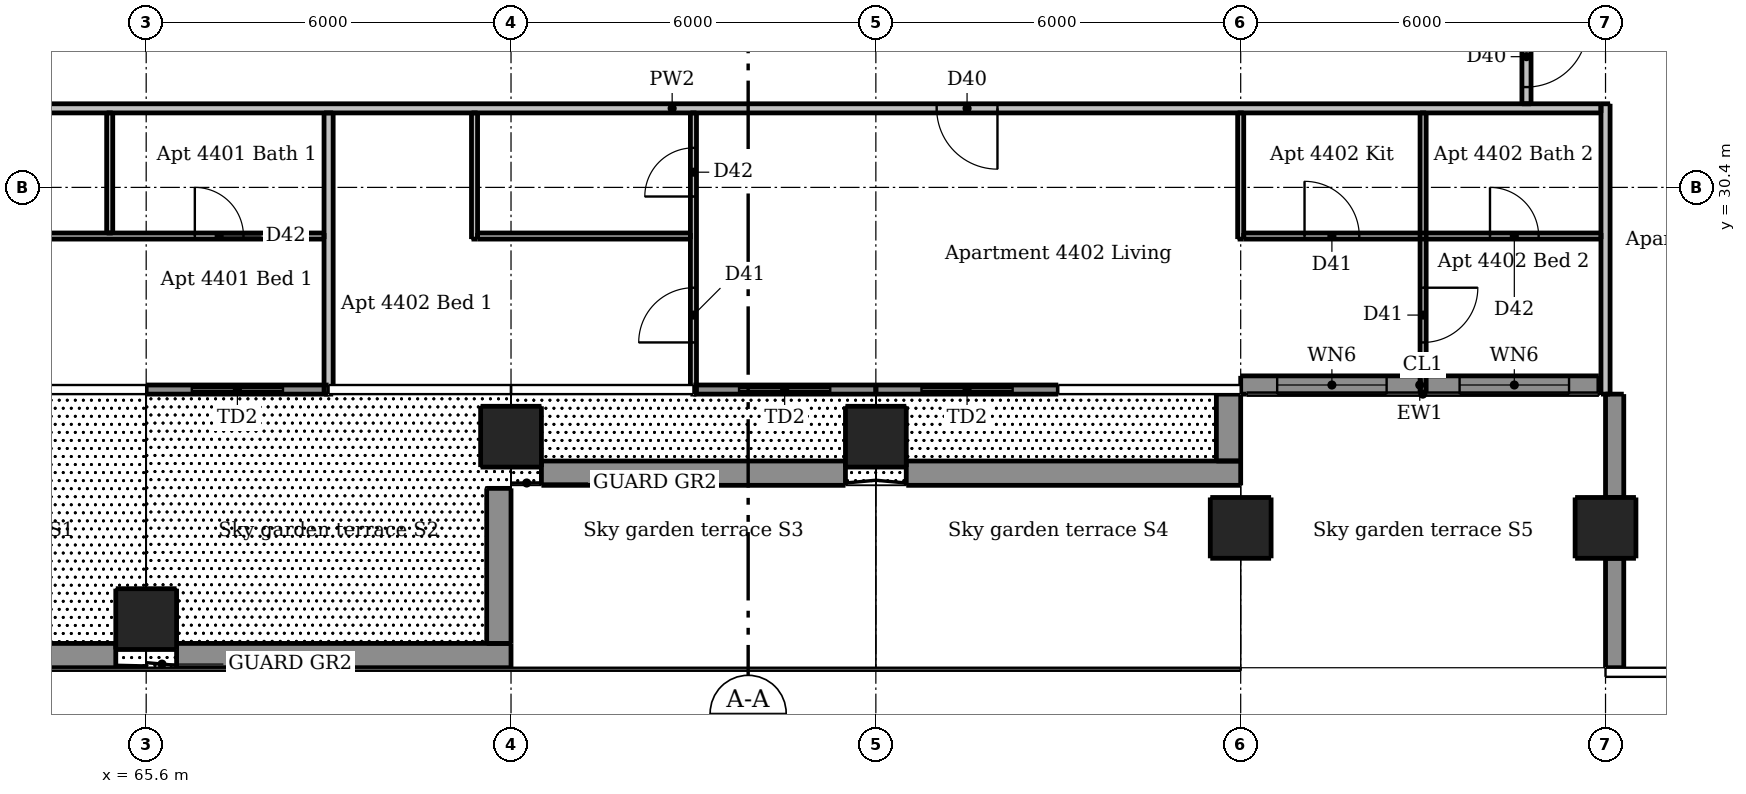
"""IFC4 building model, lengths in metres.
Left out: names, types, materials, properties, quantities, classifications, styles, units other than length and angle.
Written with IfcOpenShell. Run it as: python <this file> out.ifc"""

import sys

from ifc_helpers import new_model, si_unit, direction, frame, frame_2d, origin, origin_2d, place, context, subcontext, project, spatial, rectangle, extrude, element, fill, save


model = new_model("IFC4")
c1 = context("Model", 3, precision=1e-05, world=origin(), true_north=direction((0.0, 1.0)))
c2 = subcontext(c1, "Body", "Model", "MODEL_VIEW")
j1 = project(units=[si_unit("LENGTHUNIT", "METRE"), si_unit("PLANEANGLEUNIT", "RADIAN")], contexts=[c1])
p1 = place(None, origin())
s1 = spatial("IfcSite", under=j1, at=p1, CompositionType="ELEMENT")
p2 = place(p1, origin())
s2 = spatial("IfcBuilding", under=s1, at=p2, CompositionType="ELEMENT")
p3 = place(p2, frame((0.0, 0.0, 164.8)))
s3 = spatial("IfcBuildingStorey", under=s2, at=p3, CompositionType="ELEMENT", Elevation=164.8)
for number, where, z_axis, x_axis in (
    (1, (65.6, 23.3, 0.0), (0.0, 0.0, 1.0), (1.0, 0.0, 0.0)),
    (2, (71.6, 26.3, 0.0), (0.0, 0.0, 1.0), (1.0, 0.0, 0.0)),
    (3, (77.6, 26.3, 0.0), (0.0, 0.0, 1.0), (1.0, 0.0, 0.0)),
    (4, (83.6, 24.8, 0.0), (0.0, 0.0, 1.0), (1.0, 0.0, 0.0)),
):
    element("IfcColumn", number, at=place(p3, frame(where, z_axis=z_axis, x_axis=x_axis)), inside=s3, PredefinedType="COLUMN", context=c2, shape_type="SweptSolid", body=[
        extrude(rectangle(XDim=1.0, YDim=1.0, at=origin_2d()), origin(), (0.0, 0.0, 1.0), 3.3),
    ])
p4 = place(p3, frame((89.6, 24.8, 0.0), z_axis=(0.0, 0.0, 1.0), x_axis=(1.0, 0.0, 0.0)))
e5 = element("IfcColumn", 5, at=p4, inside=s3, PredefinedType="COLUMN", context=c2, shape_type="SweptSolid", body=[
    extrude(rectangle(XDim=1.0, YDim=1.0, at=origin_2d()), origin(), (0.0, 0.0, 1.0), 3.05),
])
p5 = place(p3, frame((89.75, 27.0, 0.0), z_axis=(0.0, 0.0, 1.0), x_axis=(0.0, -1.0, 0.0)))
e6 = element("IfcWall", 6, at=p5, inside=s3, PredefinedType="SOLIDWALL", context=c2, shape_type="SweptSolid", body=[
    extrude(rectangle(XDim=1.7, YDim=0.3, at=frame_2d((0.85, 0.0))), origin(), (0.0, 0.0, 1.0), 3.05),
])
p6 = place(p3, frame((89.75, 24.3, 0.0), z_axis=(0.0, 0.0, 1.0), x_axis=(0.0, -1.0, 0.0)))
e7 = element("IfcWall", 7, at=p6, inside=s3, PredefinedType="SOLIDWALL", context=c2, shape_type="SweptSolid", body=[
    extrude(rectangle(XDim=1.8, YDim=0.3, at=frame_2d((0.9, 0.0))), origin(), (0.0, 0.0, 1.0), 3.05),
])
p7 = place(p3, frame((65.6, 27.075, 0.0), z_axis=(0.0, 0.0, 1.0), x_axis=(1.0, 0.0, 0.0)))
e8 = element("IfcWall", 8, at=p7, inside=s3, PredefinedType="SOLIDWALL", context=c2, shape_type="SweptSolid", body=[
    extrude(rectangle(XDim=3.0, YDim=0.15, at=frame_2d((1.5, 0.0))), origin(), (0.0, 0.0, 1.0), 3.05),
])
p8 = place(p7, frame((0.75, 0.0, 0.0)))
e9 = element("IfcOpeningElement", 9, at=p8, cuts=e8, PredefinedType="OPENING", context=c2, shape_type="SweptSolid", body=[
    extrude(rectangle(XDim=1.5, YDim=2.4, at=frame_2d((0.75, 1.2))), frame((0.0, 0.085, 0.0), z_axis=(0.0, -1.0, 0.0), x_axis=(1.0, 0.0, 0.0)), (0.0, 0.0, 1.0), 0.17),
])
p9 = place(p3, frame((74.6, 27.075, 0.0), z_axis=(0.0, 0.0, 1.0), x_axis=(1.0, 0.0, 0.0)))
e10 = element("IfcWall", 10, at=p9, inside=s3, PredefinedType="SOLIDWALL", context=c2, shape_type="SweptSolid", body=[
    extrude(rectangle(XDim=3.0, YDim=0.15, at=frame_2d((1.5, 0.0))), origin(), (0.0, 0.0, 1.0), 3.05),
])
p10 = place(p9, frame((0.75, 0.0, 0.0)))
e11 = element("IfcOpeningElement", 11, at=p10, cuts=e10, PredefinedType="OPENING", context=c2, shape_type="SweptSolid", body=[
    extrude(rectangle(XDim=1.5, YDim=2.4, at=frame_2d((0.75, 1.2))), frame((0.0, 0.085, 0.0), z_axis=(0.0, -1.0, 0.0), x_axis=(1.0, 0.0, 0.0)), (0.0, 0.0, 1.0), 0.17),
])
p11 = place(p3, frame((77.6, 27.075, 0.0), z_axis=(0.0, 0.0, 1.0), x_axis=(1.0, 0.0, 0.0)))
e12 = element("IfcWall", 12, at=p11, inside=s3, PredefinedType="SOLIDWALL", context=c2, shape_type="SweptSolid", body=[
    extrude(rectangle(XDim=3.0, YDim=0.15, at=frame_2d((1.5, 0.0))), origin(), (0.0, 0.0, 1.0), 3.05),
])
p12 = place(p11, frame((0.75, 0.0, 0.0)))
e13 = element("IfcOpeningElement", 13, at=p12, cuts=e12, PredefinedType="OPENING", context=c2, shape_type="SweptSolid", body=[
    extrude(rectangle(XDim=1.5, YDim=2.4, at=frame_2d((0.75, 1.2))), frame((0.0, 0.085, 0.0), z_axis=(0.0, -1.0, 0.0), x_axis=(1.0, 0.0, 0.0)), (0.0, 0.0, 1.0), 0.17),
])
p13 = place(p3, frame((83.6, 27.15, 0.0), z_axis=(0.0, 0.0, 1.0), x_axis=(1.0, 0.0, 0.0)))
e14 = element("IfcWall", 14, at=p13, inside=s3, PredefinedType="SOLIDWALL", context=c2, shape_type="SweptSolid", body=[
    extrude(rectangle(XDim=5.89, YDim=0.3, at=frame_2d((2.945, 0.0))), origin(), (0.0, 0.0, 1.0), 3.05),
])
p14 = place(p13, frame((0.6, 0.0, 0.15)))
e15 = element("IfcOpeningElement", 15, at=p14, cuts=e14, PredefinedType="OPENING", context=c2, shape_type="SweptSolid", body=[
    extrude(rectangle(XDim=1.8, YDim=2.1, at=frame_2d((0.9, 1.05))), frame((0.0, 0.16, 0.0), z_axis=(0.0, -1.0, 0.0), x_axis=(1.0, 0.0, 0.0)), (0.0, 0.0, 1.0), 0.32),
])
p15 = place(p13, frame((3.6, 0.0, 0.15)))
e16 = element("IfcOpeningElement", 16, at=p15, cuts=e14, PredefinedType="OPENING", context=c2, shape_type="SweptSolid", body=[
    extrude(rectangle(XDim=1.8, YDim=2.1, at=frame_2d((0.9, 1.05))), frame((0.0, 0.16, 0.0), z_axis=(0.0, -1.0, 0.0), x_axis=(1.0, 0.0, 0.0)), (0.0, 0.0, 1.0), 0.32),
])
p16 = place(p3, frame((60.1, 22.7, 0.03), z_axis=(0.0, 0.0, 1.0), x_axis=(1.0, 0.0, 0.0)))
e17 = element("IfcWall", 17, at=p16, inside=s3, PredefinedType="PARAPET", context=c2, shape_type="SweptSolid", body=[
    extrude(rectangle(XDim=5.0, YDim=0.4, at=frame_2d((2.5, 0.0))), origin(), (0.0, 0.0, 1.0), 1.1),
])
p17 = place(p3, frame((66.1, 22.7, 0.03), z_axis=(0.0, 0.0, 1.0), x_axis=(1.0, 0.0, 0.0)))
e18 = element("IfcWall", 18, at=p17, inside=s3, PredefinedType="PARAPET", context=c2, shape_type="SweptSolid", body=[
    extrude(rectangle(XDim=5.5, YDim=0.4, at=frame_2d((2.75, 0.0))), origin(), (0.0, 0.0, 1.0), 1.1),
])
p18 = place(p3, frame((71.4, 22.9, 0.03), z_axis=(0.0, 0.0, 1.0), x_axis=(0.0, 1.0, 0.0)))
e19 = element("IfcWall", 19, at=p18, inside=s3, PredefinedType="PARAPET", context=c2, shape_type="SweptSolid", body=[
    extrude(rectangle(XDim=2.55, YDim=0.4, at=frame_2d((1.275, 0.0))), origin(), (0.0, 0.0, 1.0), 1.1),
])
p19 = place(p3, frame((72.1, 25.7, 0.03), z_axis=(0.0, 0.0, 1.0), x_axis=(1.0, 0.0, 0.0)))
e20 = element("IfcWall", 20, at=p19, inside=s3, PredefinedType="PARAPET", context=c2, shape_type="SweptSolid", body=[
    extrude(rectangle(XDim=5.0, YDim=0.4, at=frame_2d((2.5, 0.0))), origin(), (0.0, 0.0, 1.0), 1.1),
])
p20 = place(p3, frame((78.1, 25.7, 0.03), z_axis=(0.0, 0.0, 1.0), x_axis=(1.0, 0.0, 0.0)))
e21 = element("IfcWall", 21, at=p20, inside=s3, PredefinedType="PARAPET", context=c2, shape_type="SweptSolid", body=[
    extrude(rectangle(XDim=5.5, YDim=0.4, at=frame_2d((2.75, 0.0))), origin(), (0.0, 0.0, 1.0), 1.1),
])
p21 = place(p3, frame((83.4, 25.9, 0.03), z_axis=(0.0, 0.0, 1.0), x_axis=(0.0, 1.0, 0.0)))
e22 = element("IfcWall", 22, at=p21, inside=s3, PredefinedType="PARAPET", context=c2, shape_type="SweptSolid", body=[
    extrude(rectangle(XDim=1.1, YDim=0.4, at=frame_2d((0.55, 0.0))), origin(), (0.0, 0.0, 1.0), 1.1),
])
p22 = place(p3, frame((65.0, 29.65, 0.0), z_axis=(0.0, 0.0, 1.0), x_axis=(0.0, 1.0, 0.0)))
e23 = element("IfcWall", 23, at=p22, inside=s3, PredefinedType="PARTITIONING", context=c2, shape_type="SweptSolid", body=[
    extrude(rectangle(XDim=1.975, YDim=0.1, at=frame_2d((0.988, 0.0))), origin(), (0.0, 0.0, 1.0), 3.05),
])
p23 = place(p3, frame((71.0, 29.55, 0.0), z_axis=(0.0, 0.0, 1.0), x_axis=(0.0, 1.0, 0.0)))
e24 = element("IfcWall", 24, at=p23, inside=s3, PredefinedType="PARTITIONING", context=c2, shape_type="SweptSolid", body=[
    extrude(rectangle(XDim=2.075, YDim=0.1, at=frame_2d((1.038, 0.0))), origin(), (0.0, 0.0, 1.0), 3.05),
])
p24 = place(p3, frame((74.6, 27.0, 0.0), z_axis=(0.0, 0.0, 1.0), x_axis=(0.0, 1.0, 0.0)))
e25 = element("IfcWall", 25, at=p24, inside=s3, PredefinedType="PARTITIONING", context=c2, shape_type="SweptSolid", body=[
    extrude(rectangle(XDim=4.625, YDim=0.1, at=frame_2d((2.312, 0.0))), origin(), (0.0, 0.0, 1.0), 3.05),
])
p25 = place(p24, frame((0.85, 0.0, 0.0)))
e26 = element("IfcOpeningElement", 26, at=p25, cuts=e25, PredefinedType="OPENING", context=c2, shape_type="SweptSolid", body=[
    extrude(rectangle(XDim=0.9, YDim=2.1, at=frame_2d((0.45, 1.05))), frame((0.0, 0.06, 0.0), z_axis=(0.0, -1.0, 0.0), x_axis=(1.0, 0.0, 0.0)), (0.0, 0.0, 1.0), 0.12),
])
p26 = place(p24, frame((3.25, 0.0, 0.0)))
e27 = element("IfcOpeningElement", 27, at=p26, cuts=e25, PredefinedType="OPENING", context=c2, shape_type="SweptSolid", body=[
    extrude(rectangle(XDim=0.8, YDim=2.1, at=frame_2d((0.4, 1.05))), frame((0.0, 0.06, 0.0), z_axis=(0.0, -1.0, 0.0), x_axis=(1.0, 0.0, 0.0)), (0.0, 0.0, 1.0), 0.12),
])
p27 = place(p3, frame((83.6, 29.55, 0.0), z_axis=(0.0, 0.0, 1.0), x_axis=(0.0, 1.0, 0.0)))
e28 = element("IfcWall", 28, at=p27, inside=s3, PredefinedType="PARTITIONING", context=c2, shape_type="SweptSolid", body=[
    extrude(rectangle(XDim=2.075, YDim=0.1, at=frame_2d((1.038, 0.0))), origin(), (0.0, 0.0, 1.0), 2.59),
])
p28 = place(p3, frame((86.6, 31.625, 0.0), z_axis=(0.0, 0.0, 1.0), x_axis=(0.0, -1.0, 0.0)))
e29 = element("IfcWall", 29, at=p28, inside=s3, PredefinedType="PARTITIONING", context=c2, shape_type="SweptSolid", body=[
    extrude(rectangle(XDim=4.625, YDim=0.1, at=frame_2d((2.312, 0.0))), origin(), (0.0, 0.0, 1.0), 3.05),
])
p29 = place(p28, frame((2.875, 0.0, 0.0)))
e30 = element("IfcOpeningElement", 30, at=p29, cuts=e29, PredefinedType="OPENING", context=c2, shape_type="SweptSolid", body=[
    extrude(rectangle(XDim=0.9, YDim=2.1, at=frame_2d((0.45, 1.05))), frame((0.0, 0.06, 0.0), z_axis=(0.0, -1.0, 0.0), x_axis=(1.0, 0.0, 0.0)), (0.0, 0.0, 1.0), 0.12),
])
p30 = place(p3, frame((62.65, 29.6, 0.0), z_axis=(0.0, 0.0, 1.0), x_axis=(1.0, 0.0, 0.0)))
e31 = element("IfcWall", 31, at=p30, inside=s3, PredefinedType="PARTITIONING", context=c2, shape_type="SweptSolid", body=[
    extrude(rectangle(XDim=5.875, YDim=0.1, at=frame_2d((2.938, 0.0))), origin(), (0.0, 0.0, 1.0), 3.05),
])
p31 = place(p30, frame((3.75, 0.0, 0.0)))
e32 = element("IfcOpeningElement", 32, at=p31, cuts=e31, PredefinedType="OPENING", context=c2, shape_type="SweptSolid", body=[
    extrude(rectangle(XDim=0.8, YDim=2.1, at=frame_2d((0.4, 1.05))), frame((0.0, 0.06, 0.0), z_axis=(0.0, -1.0, 0.0), x_axis=(1.0, 0.0, 0.0)), (0.0, 0.0, 1.0), 0.12),
])
p32 = place(p3, frame((71.05, 29.6, 0.0), z_axis=(0.0, 0.0, 1.0), x_axis=(1.0, 0.0, 0.0)))
e33 = element("IfcWall", 33, at=p32, inside=s3, PredefinedType="PARTITIONING", context=c2, shape_type="SweptSolid", body=[
    extrude(rectangle(XDim=3.5, YDim=0.1, at=frame_2d((1.75, 0.0))), origin(), (0.0, 0.0, 1.0), 3.05),
])
p33 = place(p3, frame((83.65, 29.6, 0.0), z_axis=(0.0, 0.0, 1.0), x_axis=(1.0, 0.0, 0.0)))
e34 = element("IfcWall", 34, at=p33, inside=s3, PredefinedType="PARTITIONING", context=c2, shape_type="SweptSolid", body=[
    extrude(rectangle(XDim=5.875, YDim=0.1, at=frame_2d((2.938, 0.0))), origin(), (0.0, 0.0, 1.0), 3.05),
])
p34 = place(p33, frame((1.0, 0.0, 0.0)))
e35 = element("IfcOpeningElement", 35, at=p34, cuts=e34, PredefinedType="OPENING", context=c2, shape_type="SweptSolid", body=[
    extrude(rectangle(XDim=0.9, YDim=2.1, at=frame_2d((0.45, 1.05))), frame((0.0, 0.06, 0.0), z_axis=(0.0, -1.0, 0.0), x_axis=(1.0, 0.0, 0.0)), (0.0, 0.0, 1.0), 0.12),
])
p35 = place(p33, frame((4.05, 0.0, 0.0)))
e36 = element("IfcOpeningElement", 36, at=p35, cuts=e34, PredefinedType="OPENING", context=c2, shape_type="SweptSolid", body=[
    extrude(rectangle(XDim=0.8, YDim=2.1, at=frame_2d((0.4, 1.05))), frame((0.0, 0.06, 0.0), z_axis=(0.0, -1.0, 0.0), x_axis=(1.0, 0.0, 0.0)), (0.0, 0.0, 1.0), 0.12),
])
p36 = place(p3, frame((68.6, 27.0, 0.0), z_axis=(0.0, 0.0, 1.0), x_axis=(0.0, 1.0, 0.0)))
e37 = element("IfcWall", 37, at=p36, inside=s3, PredefinedType="PARTITIONING", context=c2, shape_type="SweptSolid", body=[
    extrude(rectangle(XDim=4.625, YDim=0.15, at=frame_2d((2.312, 0.0))), origin(), (0.0, 0.0, 1.0), 3.05),
])
p37 = place(p3, frame((88.3, 61.175, 0.0), z_axis=(0.0, 0.0, 1.0), x_axis=(0.0, -1.0, 0.0)))
e38 = element("IfcWall", 38, at=p37, inside=s3, PredefinedType="PARTITIONING", context=c2, shape_type="SweptSolid", body=[
    extrude(rectangle(XDim=29.4, YDim=0.15, at=frame_2d((14.7, 0.0))), origin(), (0.0, 0.0, 1.0), 3.05),
])
p38 = place(p37, frame((28.125, 0.0, 0.0)))
e39 = element("IfcOpeningElement", 39, at=p38, cuts=e38, PredefinedType="OPENING", context=c2, shape_type="SweptSolid", body=[
    extrude(rectangle(XDim=1.0, YDim=2.1, at=frame_2d((0.5, 1.05))), frame((0.0, 0.085, 0.0), z_axis=(0.0, -1.0, 0.0), x_axis=(1.0, 0.0, 0.0)), (0.0, 0.0, 1.0), 0.17),
])
p39 = place(p37, frame((13.775, 0.0, 0.0)))
e40 = element("IfcOpeningElement", 40, at=p39, cuts=e38, PredefinedType="OPENING", context=c2, shape_type="SweptSolid", body=[
    extrude(rectangle(XDim=1.0, YDim=2.1, at=frame_2d((0.5, 1.05))), frame((0.0, 0.085, 0.0), z_axis=(0.0, -1.0, 0.0), x_axis=(1.0, 0.0, 0.0)), (0.0, 0.0, 1.0), 0.17),
])
p40 = place(p37, frame((3.275, 0.0, 0.0)))
e41 = element("IfcOpeningElement", 41, at=p40, cuts=e38, PredefinedType="OPENING", context=c2, shape_type="SweptSolid", body=[
    extrude(rectangle(XDim=1.0, YDim=2.1, at=frame_2d((0.5, 1.05))), frame((0.0, 0.085, 0.0), z_axis=(0.0, -1.0, 0.0), x_axis=(1.0, 0.0, 0.0)), (0.0, 0.0, 1.0), 0.17),
])
p41 = place(p3, frame((89.6, 27.0, 0.0), z_axis=(0.0, 0.0, 1.0), x_axis=(0.0, 1.0, 0.0)))
e42 = element("IfcWall", 42, at=p41, inside=s3, PredefinedType="PARTITIONING", context=c2, shape_type="SweptSolid", body=[
    extrude(rectangle(XDim=4.775, YDim=0.15, at=frame_2d((2.387, 0.0))), origin(), (0.0, 0.0, 1.0), 2.51),
])
p42 = place(p3, frame((89.525, 31.7, 0.0), z_axis=(0.0, 0.0, 1.0), x_axis=(-1.0, 0.0, 0.0)))
e43 = element("IfcWall", 43, at=p42, inside=s3, PredefinedType="PARTITIONING", context=c2, shape_type="SweptSolid", body=[
    extrude(rectangle(XDim=30.55, YDim=0.15, at=frame_2d((15.275, 0.0))), origin(), (0.0, 0.0, 1.0), 3.05),
])
p43 = place(p42, frame((28.275, 0.0, 0.0)))
e44 = element("IfcOpeningElement", 44, at=p43, cuts=e43, PredefinedType="OPENING", context=c2, shape_type="SweptSolid", body=[
    extrude(rectangle(XDim=1.0, YDim=2.1, at=frame_2d((0.5, 1.05))), frame((0.0, 0.085, 0.0), z_axis=(0.0, -1.0, 0.0), x_axis=(1.0, 0.0, 0.0)), (0.0, 0.0, 1.0), 0.17),
])
p44 = place(p42, frame((9.925, 0.0, 0.0)))
e45 = element("IfcOpeningElement", 45, at=p44, cuts=e43, PredefinedType="OPENING", context=c2, shape_type="SweptSolid", body=[
    extrude(rectangle(XDim=1.0, YDim=2.1, at=frame_2d((0.5, 1.05))), frame((0.0, 0.085, 0.0), z_axis=(0.0, -1.0, 0.0), x_axis=(1.0, 0.0, 0.0)), (0.0, 0.0, 1.0), 0.17),
])
p45 = place(p8, origin())
e46 = element("IfcDoor", 46, at=p45, inside=s3, OperationType="DOUBLE_DOOR_SLIDING", PredefinedType="DOOR", context=c2, shape_type="SweptSolid", body=[
    extrude(rectangle(XDim=1.5, YDim=2.4, at=frame_2d((0.75, 1.2))), frame((0.0, 0.025, 0.0), z_axis=(0.0, -1.0, 0.0), x_axis=(1.0, 0.0, 0.0)), (0.0, 0.0, 1.0), 0.05),
])
fill(e9, e46)
p46 = place(p10, origin())
e47 = element("IfcDoor", 47, at=p46, inside=s3, OperationType="DOUBLE_DOOR_SLIDING", PredefinedType="DOOR", context=c2, shape_type="SweptSolid", body=[
    extrude(rectangle(XDim=1.5, YDim=2.4, at=frame_2d((0.75, 1.2))), frame((0.0, 0.025, 0.0), z_axis=(0.0, -1.0, 0.0), x_axis=(1.0, 0.0, 0.0)), (0.0, 0.0, 1.0), 0.05),
])
fill(e11, e47)
p47 = place(p12, origin())
e48 = element("IfcDoor", 48, at=p47, inside=s3, OperationType="DOUBLE_DOOR_SLIDING", PredefinedType="DOOR", context=c2, shape_type="SweptSolid", body=[
    extrude(rectangle(XDim=1.5, YDim=2.4, at=frame_2d((0.75, 1.2))), frame((0.0, 0.025, 0.0), z_axis=(0.0, -1.0, 0.0), x_axis=(1.0, 0.0, 0.0)), (0.0, 0.0, 1.0), 0.05),
])
fill(e13, e48)
p48 = place(p14, origin())
e49 = element("IfcWindow", 49, at=p48, inside=s3, PartitioningType="DOUBLE_PANEL_VERTICAL", PredefinedType="WINDOW", context=c2, shape_type="SweptSolid", body=[
    extrude(rectangle(XDim=1.8, YDim=2.1, at=frame_2d((0.9, 1.05))), frame((0.0, 0.03, 0.0), z_axis=(0.0, -1.0, 0.0), x_axis=(1.0, 0.0, 0.0)), (0.0, 0.0, 1.0), 0.06),
])
fill(e15, e49)
p49 = place(p15, origin())
e50 = element("IfcWindow", 50, at=p49, inside=s3, PartitioningType="DOUBLE_PANEL_VERTICAL", PredefinedType="WINDOW", context=c2, shape_type="SweptSolid", body=[
    extrude(rectangle(XDim=1.8, YDim=2.1, at=frame_2d((0.9, 1.05))), frame((0.0, 0.03, 0.0), z_axis=(0.0, -1.0, 0.0), x_axis=(1.0, 0.0, 0.0)), (0.0, 0.0, 1.0), 0.06),
])
fill(e16, e50)
p50 = place(p31, origin())
e51 = element("IfcDoor", 51, at=p50, inside=s3, OperationType="SINGLE_SWING_LEFT", PredefinedType="DOOR", context=c2, shape_type="SweptSolid", body=[
    extrude(rectangle(XDim=0.8, YDim=2.1, at=frame_2d((0.4, 1.05))), frame((0.0, 0.025, 0.0), z_axis=(0.0, -1.0, 0.0), x_axis=(1.0, 0.0, 0.0)), (0.0, 0.0, 1.0), 0.05),
])
fill(e32, e51)
p51 = place(p44, origin())
e52 = element("IfcDoor", 52, at=p51, inside=s3, OperationType="SINGLE_SWING_LEFT", PredefinedType="DOOR", context=c2, shape_type="SweptSolid", body=[
    extrude(rectangle(XDim=1.0, YDim=2.1, at=frame_2d((0.5, 1.05))), frame((0.0, 0.025, 0.0), z_axis=(0.0, -1.0, 0.0), x_axis=(1.0, 0.0, 0.0)), (0.0, 0.0, 1.0), 0.05),
])
fill(e45, e52)
p52 = place(p34, origin())
e53 = element("IfcDoor", 53, at=p52, inside=s3, OperationType="SINGLE_SWING_LEFT", PredefinedType="DOOR", context=c2, shape_type="SweptSolid", body=[
    extrude(rectangle(XDim=0.9, YDim=2.1, at=frame_2d((0.45, 1.05))), frame((0.0, 0.025, 0.0), z_axis=(0.0, -1.0, 0.0), x_axis=(1.0, 0.0, 0.0)), (0.0, 0.0, 1.0), 0.05),
])
fill(e35, e53)
p53 = place(p25, origin())
e54 = element("IfcDoor", 54, at=p53, inside=s3, OperationType="SINGLE_SWING_LEFT", PredefinedType="DOOR", context=c2, shape_type="SweptSolid", body=[
    extrude(rectangle(XDim=0.9, YDim=2.1, at=frame_2d((0.45, 1.05))), frame((0.0, 0.025, 0.0), z_axis=(0.0, -1.0, 0.0), x_axis=(1.0, 0.0, 0.0)), (0.0, 0.0, 1.0), 0.05),
])
fill(e26, e54)
p54 = place(p26, origin())
e55 = element("IfcDoor", 55, at=p54, inside=s3, OperationType="SINGLE_SWING_LEFT", PredefinedType="DOOR", context=c2, shape_type="SweptSolid", body=[
    extrude(rectangle(XDim=0.8, YDim=2.1, at=frame_2d((0.4, 1.05))), frame((0.0, 0.025, 0.0), z_axis=(0.0, -1.0, 0.0), x_axis=(1.0, 0.0, 0.0)), (0.0, 0.0, 1.0), 0.05),
])
fill(e27, e55)
p55 = place(p29, origin())
e56 = element("IfcDoor", 56, at=p55, inside=s3, OperationType="SINGLE_SWING_LEFT", PredefinedType="DOOR", context=c2, shape_type="SweptSolid", body=[
    extrude(rectangle(XDim=0.9, YDim=2.1, at=frame_2d((0.45, 1.05))), frame((0.0, 0.025, 0.0), z_axis=(0.0, -1.0, 0.0), x_axis=(1.0, 0.0, 0.0)), (0.0, 0.0, 1.0), 0.05),
])
fill(e30, e56)
p56 = place(p35, origin())
e57 = element("IfcDoor", 57, at=p56, inside=s3, OperationType="SINGLE_SWING_LEFT", PredefinedType="DOOR", context=c2, shape_type="SweptSolid", body=[
    extrude(rectangle(XDim=0.8, YDim=2.1, at=frame_2d((0.4, 1.05))), frame((0.0, 0.025, 0.0), z_axis=(0.0, -1.0, 0.0), x_axis=(1.0, 0.0, 0.0)), (0.0, 0.0, 1.0), 0.05),
])
fill(e36, e57)
p57 = place(p38, origin())
e58 = element("IfcDoor", 58, at=p57, inside=s3, OperationType="SINGLE_SWING_LEFT", PredefinedType="DOOR", context=c2, shape_type="SweptSolid", body=[
    extrude(rectangle(XDim=1.0, YDim=2.1, at=frame_2d((0.5, 1.05))), frame((0.0, 0.025, 0.0), z_axis=(0.0, -1.0, 0.0), x_axis=(1.0, 0.0, 0.0)), (0.0, 0.0, 1.0), 0.05),
])
fill(e39, e58)
save(model, sys.argv[1])
